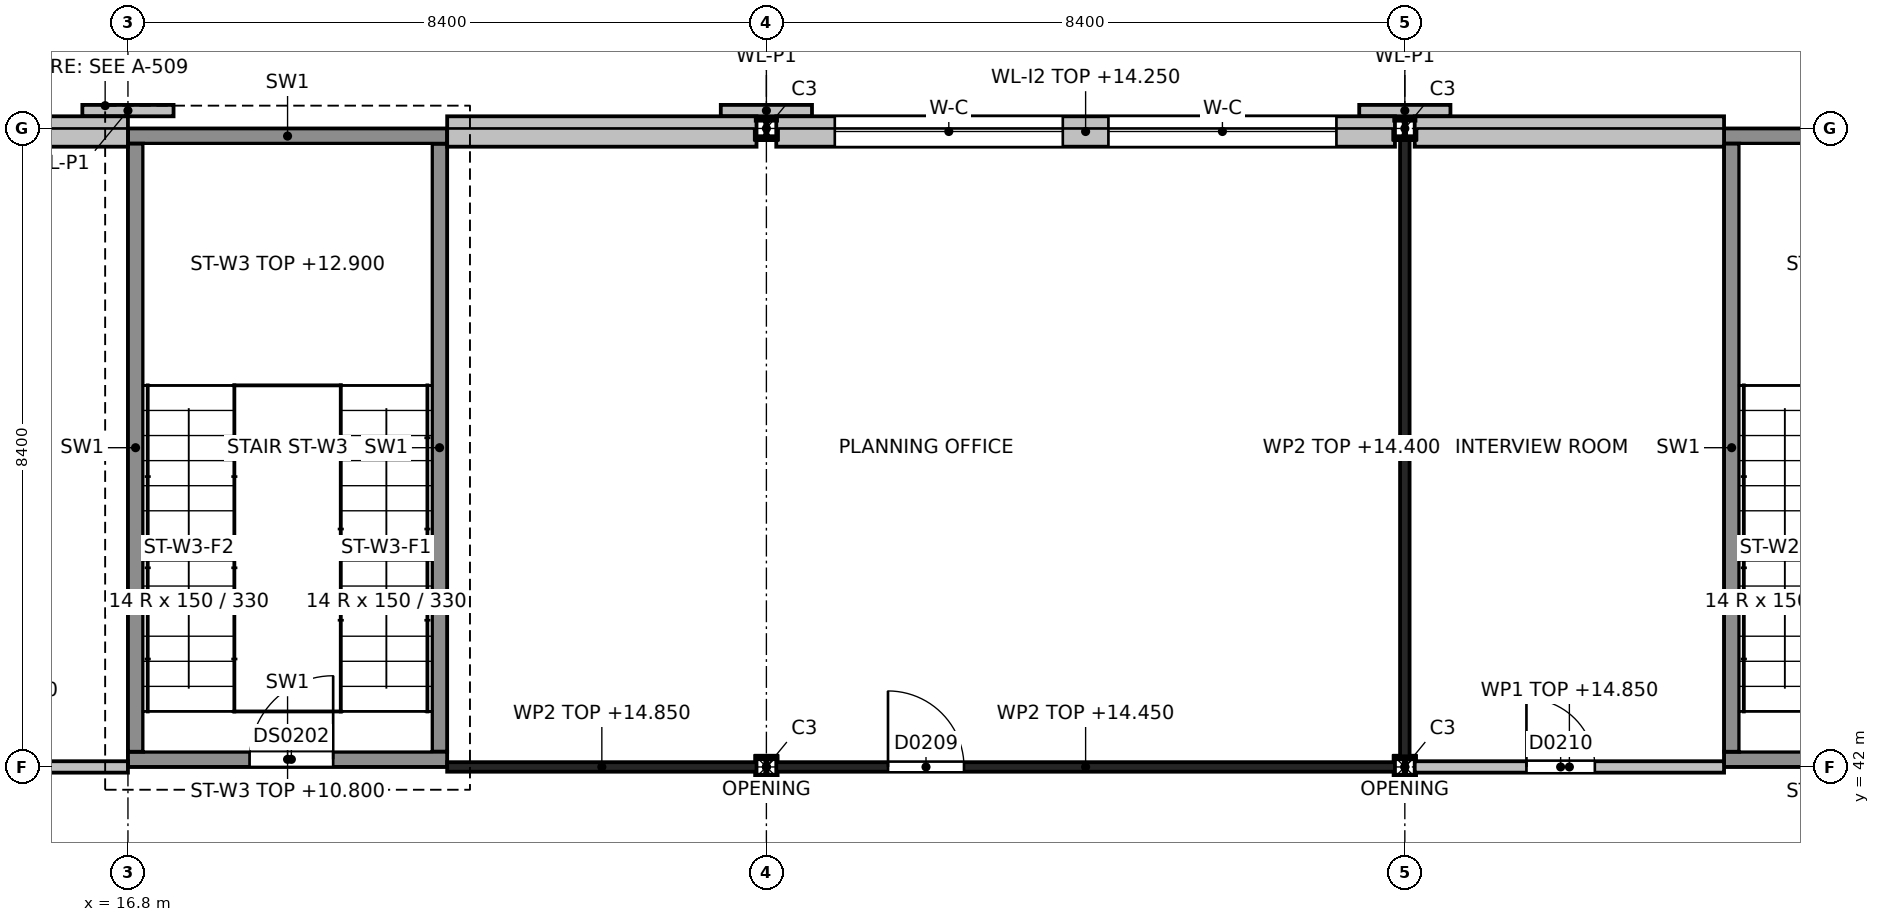
"""IFC4 building model, lengths in metres.
Left out: names, types, materials, properties, quantities, classifications, styles, units other than length and angle.
Written with IfcOpenShell. Run it as: python <this file> out.ifc"""

import sys

from ifc_helpers import new_model, si_unit, direction, frame, frame_2d, origin, origin_2d, place, context, subcontext, project, spatial, rectangle, i_section, extrude, element, fill, save


model = new_model("IFC4")
c1 = context("Model", 3, precision=1e-05, world=origin(), true_north=direction((0.0, 1.0)))
c2 = subcontext(c1, "Body", "Model", "MODEL_VIEW")
j1 = project(units=[si_unit("LENGTHUNIT", "METRE"), si_unit("PLANEANGLEUNIT", "RADIAN")], contexts=[c1])
p1 = place(None, origin())
s1 = spatial("IfcSite", under=j1, at=p1, CompositionType="ELEMENT")
p2 = place(p1, origin())
s2 = spatial("IfcBuilding", under=s1, at=p2, CompositionType="ELEMENT")
p3 = place(p2, frame((0.0, 0.0, 10.8)))
s3 = spatial("IfcBuildingStorey", under=s2, at=p3, CompositionType="ELEMENT", Elevation=10.8)
for number, where, z_axis, x_axis in (
    (1, (25.2, 42.0, 0.0), (0.0, 0.0, 1.0), (1.0, 0.0, 0.0)),
    (2, (25.2, 50.4, 0.0), (0.0, 0.0, 1.0), (1.0, 0.0, 0.0)),
    (3, (33.6, 42.0, 0.0), (0.0, 0.0, 1.0), (1.0, 0.0, 0.0)),
    (4, (33.6, 50.4, 0.0), (0.0, 0.0, 1.0), (1.0, 0.0, 0.0)),
):
    element("IfcColumn", number, at=place(p3, frame(where, z_axis=z_axis, x_axis=x_axis)), inside=s3, PredefinedType="COLUMN", context=c2, shape_type="SweptSolid", body=[
        extrude(i_section(OverallWidth=0.26, OverallDepth=0.26, WebThickness=0.01, FlangeThickness=0.018, at=origin_2d()), origin(), (0.0, 0.0, 1.0), 4.2),
    ])
p4 = place(p3, frame((37.8, 42.1, 0.0), z_axis=(0.0, 0.0, 1.0), x_axis=(1.0, 0.0, 0.0)))
e5 = element("IfcWall", 5, at=p4, inside=s3, PredefinedType="SHEAR", context=c2, shape_type="SweptSolid", body=[
    extrude(rectangle(XDim=4.2, YDim=0.2, at=frame_2d((2.1, 0.0))), origin(), (0.0, 0.0, 1.0), 4.2),
])
p5 = place(p4, frame((1.6, 0.0, 0.0)))
e6 = element("IfcOpeningElement", 6, at=p5, cuts=e5, PredefinedType="OPENING", context=c2, shape_type="SweptSolid", body=[
    extrude(rectangle(XDim=1.1, YDim=2.1, at=frame_2d((0.55, 1.05))), frame((0.0, 0.1, 0.0), z_axis=(0.0, -1.0, 0.0), x_axis=(1.0, 0.0, 0.0)), (0.0, 0.0, 1.0), 0.2),
])
p6 = place(p3, frame((37.8, 50.3, 0.0), z_axis=(0.0, 0.0, 1.0), x_axis=(1.0, 0.0, 0.0)))
e7 = element("IfcWall", 7, at=p6, inside=s3, PredefinedType="SHEAR", context=c2, shape_type="SweptSolid", body=[
    extrude(rectangle(XDim=4.2, YDim=0.2, at=frame_2d((2.1, 0.0))), origin(), (0.0, 0.0, 1.0), 4.2),
])
p7 = place(p3, frame((37.9, 42.2, 0.0), z_axis=(0.0, 0.0, 1.0), x_axis=(0.0, 1.0, 0.0)))
e8 = element("IfcWall", 8, at=p7, inside=s3, PredefinedType="SHEAR", context=c2, shape_type="SweptSolid", body=[
    extrude(rectangle(XDim=8.0, YDim=0.2, at=frame_2d((4.0, 0.0))), origin(), (0.0, 0.0, 1.0), 4.2),
])
p8 = place(p3, frame((16.8, 42.1, 0.0), z_axis=(0.0, 0.0, 1.0), x_axis=(1.0, 0.0, 0.0)))
e9 = element("IfcWall", 9, at=p8, inside=s3, PredefinedType="SHEAR", context=c2, shape_type="SweptSolid", body=[
    extrude(rectangle(XDim=4.2, YDim=0.2, at=frame_2d((2.1, 0.0))), origin(), (0.0, 0.0, 1.0), 4.2),
])
p9 = place(p8, frame((1.6, 0.0, 0.0)))
e10 = element("IfcOpeningElement", 10, at=p9, cuts=e9, PredefinedType="OPENING", context=c2, shape_type="SweptSolid", body=[
    extrude(rectangle(XDim=1.1, YDim=2.1, at=frame_2d((0.55, 1.05))), frame((0.0, 0.1, 0.0), z_axis=(0.0, -1.0, 0.0), x_axis=(1.0, 0.0, 0.0)), (0.0, 0.0, 1.0), 0.2),
])
p10 = place(p3, frame((16.8, 50.3, 0.0), z_axis=(0.0, 0.0, 1.0), x_axis=(1.0, 0.0, 0.0)))
e11 = element("IfcWall", 11, at=p10, inside=s3, PredefinedType="SHEAR", context=c2, shape_type="SweptSolid", body=[
    extrude(rectangle(XDim=4.2, YDim=0.2, at=frame_2d((2.1, 0.0))), origin(), (0.0, 0.0, 1.0), 4.2),
])
for number, where, z_axis, x_axis in (
    (12, (16.9, 42.2, 0.0), (0.0, 0.0, 1.0), (0.0, 1.0, 0.0)),
    (13, (20.9, 42.2, 0.0), (0.0, 0.0, 1.0), (0.0, 1.0, 0.0)),
):
    element("IfcWall", number, at=place(p3, frame(where, z_axis=z_axis, x_axis=x_axis)), inside=s3, PredefinedType="SHEAR", context=c2, shape_type="SweptSolid", body=[
        extrude(rectangle(XDim=8.0, YDim=0.2, at=frame_2d((4.0, 0.0))), origin(), (0.0, 0.0, 1.0), 4.2),
    ])
p11 = place(p3, frame((8.53, 50.36, 0.0), z_axis=(0.0, 0.0, 1.0), x_axis=(1.0, 0.0, 0.0)))
e14 = element("IfcWall", 14, at=p11, inside=s3, PredefinedType="SOLIDWALL", context=c2, shape_type="SweptSolid", body=[
    extrude(rectangle(XDim=8.27, YDim=0.4, at=frame_2d((4.135, 0.0))), origin(), (0.0, 0.0, 1.0), 3.45),
])
p12 = place(p11, frame((1.433, 0.0, 0.9)))
e15 = element("IfcOpeningElement", 15, at=p12, cuts=e14, PredefinedType="OPENING", context=c2, shape_type="SweptSolid", body=[
    extrude(rectangle(XDim=1.2, YDim=2.4, at=frame_2d((0.6, 1.2))), frame((0.0, 0.2, 0.0), z_axis=(0.0, -1.0, 0.0), x_axis=(1.0, 0.0, 0.0)), (0.0, 0.0, 1.0), 0.4),
])
p13 = place(p11, frame((5.508, 0.0, 0.9)))
e16 = element("IfcOpeningElement", 16, at=p13, cuts=e14, PredefinedType="OPENING", context=c2, shape_type="SweptSolid", body=[
    extrude(rectangle(XDim=1.2, YDim=2.4, at=frame_2d((0.6, 1.2))), frame((0.0, 0.2, 0.0), z_axis=(0.0, -1.0, 0.0), x_axis=(1.0, 0.0, 0.0)), (0.0, 0.0, 1.0), 0.4),
])
p14 = place(p3, frame((21.0, 50.36, 0.0), z_axis=(0.0, 0.0, 1.0), x_axis=(1.0, 0.0, 0.0)))
e17 = element("IfcWall", 17, at=p14, inside=s3, PredefinedType="SOLIDWALL", context=c2, shape_type="SweptSolid", body=[
    extrude(rectangle(XDim=4.07, YDim=0.4, at=frame_2d((2.035, 0.0))), origin(), (0.0, 0.0, 1.0), 3.45),
])
p15 = place(p3, frame((25.33, 50.36, 0.0), z_axis=(0.0, 0.0, 1.0), x_axis=(1.0, 0.0, 0.0)))
e18 = element("IfcWall", 18, at=p15, inside=s3, PredefinedType="SOLIDWALL", context=c2, shape_type="SweptSolid", body=[
    extrude(rectangle(XDim=8.14, YDim=0.4, at=frame_2d((4.07, 0.0))), origin(), (0.0, 0.0, 1.0), 3.45),
])
p16 = place(p15, frame((0.77, 0.0, 0.9)))
e19 = element("IfcOpeningElement", 19, at=p16, cuts=e18, PredefinedType="OPENING", context=c2, shape_type="SweptSolid", body=[
    extrude(rectangle(XDim=3.0, YDim=2.4, at=frame_2d((1.5, 1.2))), frame((0.0, 0.2, 0.0), z_axis=(0.0, -1.0, 0.0), x_axis=(1.0, 0.0, 0.0)), (0.0, 0.0, 1.0), 0.4),
])
p17 = place(p15, frame((4.37, 0.0, 0.9)))
e20 = element("IfcOpeningElement", 20, at=p17, cuts=e18, PredefinedType="OPENING", context=c2, shape_type="SweptSolid", body=[
    extrude(rectangle(XDim=3.0, YDim=2.4, at=frame_2d((1.5, 1.2))), frame((0.0, 0.2, 0.0), z_axis=(0.0, -1.0, 0.0), x_axis=(1.0, 0.0, 0.0)), (0.0, 0.0, 1.0), 0.4),
])
p18 = place(p3, frame((33.73, 50.36, 0.0), z_axis=(0.0, 0.0, 1.0), x_axis=(1.0, 0.0, 0.0)))
e21 = element("IfcWall", 21, at=p18, inside=s3, PredefinedType="SOLIDWALL", context=c2, shape_type="SweptSolid", body=[
    extrude(rectangle(XDim=4.07, YDim=0.4, at=frame_2d((2.035, 0.0))), origin(), (0.0, 0.0, 1.0), 3.45),
])
for number, where, z_axis, x_axis in (
    (22, (16.2, 50.635, 0.0), (0.0, 0.0, 1.0), (1.0, 0.0, 0.0)),
    (23, (24.6, 50.635, 0.0), (0.0, 0.0, 1.0), (1.0, 0.0, 0.0)),
    (24, (33.0, 50.635, 0.0), (0.0, 0.0, 1.0), (1.0, 0.0, 0.0)),
):
    element("IfcWall", number, at=place(p3, frame(where, z_axis=z_axis, x_axis=x_axis)), inside=s3, PredefinedType="SOLIDWALL", context=c2, shape_type="SweptSolid", body=[
        extrude(rectangle(XDim=1.2, YDim=0.15, at=frame_2d((0.6, 0.0))), origin(), (0.0, 0.0, 1.0), 4.2),
    ])
p19 = place(p3, frame((12.6, 42.0, 0.0), z_axis=(0.0, 0.0, 1.0), x_axis=(1.0, 0.0, 0.0)))
e25 = element("IfcWall", 25, at=p19, inside=s3, PredefinedType="PARTITIONING", context=c2, shape_type="SweptSolid", body=[
    extrude(rectangle(XDim=4.2, YDim=0.15, at=frame_2d((2.1, 0.0))), origin(), (0.0, 0.0, 1.0), 3.68),
])
p20 = place(p19, frame((1.6, 0.0, 0.0)))
e26 = element("IfcOpeningElement", 26, at=p20, cuts=e25, PredefinedType="OPENING", context=c2, shape_type="SweptSolid", body=[
    extrude(rectangle(XDim=0.9, YDim=2.1, at=frame_2d((0.45, 1.05))), frame((0.0, 0.075, 0.0), z_axis=(0.0, -1.0, 0.0), x_axis=(1.0, 0.0, 0.0)), (0.0, 0.0, 1.0), 0.15),
])
p21 = place(p3, frame((21.0, 42.0, 0.0), z_axis=(0.0, 0.0, 1.0), x_axis=(1.0, 0.0, 0.0)))
e27 = element("IfcWall", 27, at=p21, inside=s3, PredefinedType="PARTITIONING", context=c2, shape_type="SweptSolid", body=[
    extrude(rectangle(XDim=4.07, YDim=0.125, at=frame_2d((2.035, 0.0))), origin(), (0.0, 0.0, 1.0), 4.05),
])
p22 = place(p3, frame((25.33, 42.0, 0.0), z_axis=(0.0, 0.0, 1.0), x_axis=(1.0, 0.0, 0.0)))
e28 = element("IfcWall", 28, at=p22, inside=s3, PredefinedType="PARTITIONING", context=c2, shape_type="SweptSolid", body=[
    extrude(rectangle(XDim=8.14, YDim=0.125, at=frame_2d((4.07, 0.0))), origin(), (0.0, 0.0, 1.0), 3.65),
])
p23 = place(p22, frame((1.47, 0.0, 0.0)))
e29 = element("IfcOpeningElement", 29, at=p23, cuts=e28, PredefinedType="OPENING", context=c2, shape_type="SweptSolid", body=[
    extrude(rectangle(XDim=1.0, YDim=2.2, at=frame_2d((0.5, 1.1))), frame((0.0, 0.062, 0.0), z_axis=(0.0, -1.0, 0.0), x_axis=(1.0, 0.0, 0.0)), (0.0, 0.0, 1.0), 0.125),
])
p24 = place(p3, frame((33.73, 42.0, 0.0), z_axis=(0.0, 0.0, 1.0), x_axis=(1.0, 0.0, 0.0)))
e30 = element("IfcWall", 30, at=p24, inside=s3, PredefinedType="PARTITIONING", context=c2, shape_type="SweptSolid", body=[
    extrude(rectangle(XDim=4.07, YDim=0.15, at=frame_2d((2.035, 0.0))), origin(), (0.0, 0.0, 1.0), 4.05),
])
p25 = place(p24, frame((1.47, 0.0, 0.0)))
e31 = element("IfcOpeningElement", 31, at=p25, cuts=e30, PredefinedType="OPENING", context=c2, shape_type="SweptSolid", body=[
    extrude(rectangle(XDim=0.9, YDim=2.1, at=frame_2d((0.45, 1.05))), frame((0.0, 0.075, 0.0), z_axis=(0.0, -1.0, 0.0), x_axis=(1.0, 0.0, 0.0)), (0.0, 0.0, 1.0), 0.15),
])
p26 = place(p3, frame((33.6, 42.13, 0.0), z_axis=(0.0, 0.0, 1.0), x_axis=(0.0, 1.0, 0.0)))
e32 = element("IfcWall", 32, at=p26, inside=s3, PredefinedType="PARTITIONING", context=c2, shape_type="SweptSolid", body=[
    extrude(rectangle(XDim=8.14, YDim=0.125, at=frame_2d((4.07, 0.0))), origin(), (0.0, 0.0, 1.0), 3.6),
])
p27 = place(p16, origin())
e33 = element("IfcWindow", 33, at=p27, inside=s3, PartitioningType="SINGLE_PANEL", PredefinedType="WINDOW", context=c2, shape_type="SweptSolid", body=[
    extrude(rectangle(XDim=3.0, YDim=2.4, at=frame_2d((1.5, 1.2))), frame((0.0, 0.03, 0.0), z_axis=(0.0, -1.0, 0.0), x_axis=(1.0, 0.0, 0.0)), (0.0, 0.0, 1.0), 0.06),
])
fill(e19, e33)
p28 = place(p17, origin())
e34 = element("IfcWindow", 34, at=p28, inside=s3, PartitioningType="SINGLE_PANEL", PredefinedType="WINDOW", context=c2, shape_type="SweptSolid", body=[
    extrude(rectangle(XDim=3.0, YDim=2.4, at=frame_2d((1.5, 1.2))), frame((0.0, 0.03, 0.0), z_axis=(0.0, -1.0, 0.0), x_axis=(1.0, 0.0, 0.0)), (0.0, 0.0, 1.0), 0.06),
])
fill(e20, e34)
p29 = place(p23, origin())
e35 = element("IfcDoor", 35, at=p29, inside=s3, OperationType="SINGLE_SWING_LEFT", PredefinedType="DOOR", context=c2, shape_type="SweptSolid", body=[
    extrude(rectangle(XDim=1.0, YDim=2.2, at=frame_2d((0.5, 1.1))), frame((0.0, 0.025, 0.0), z_axis=(0.0, -1.0, 0.0), x_axis=(1.0, 0.0, 0.0)), (0.0, 0.0, 1.0), 0.05),
])
fill(e29, e35)
p30 = place(p25, origin())
e36 = element("IfcDoor", 36, at=p30, inside=s3, OperationType="SINGLE_SWING_LEFT", PredefinedType="DOOR", context=c2, shape_type="SweptSolid", body=[
    extrude(rectangle(XDim=0.9, YDim=2.1, at=frame_2d((0.45, 1.05))), frame((0.0, 0.025, 0.0), z_axis=(0.0, -1.0, 0.0), x_axis=(1.0, 0.0, 0.0)), (0.0, 0.0, 1.0), 0.05),
])
fill(e31, e36)
p31 = place(p9, origin())
e37 = element("IfcDoor", 37, at=p31, inside=s3, OperationType="SINGLE_SWING_RIGHT", PredefinedType="DOOR", context=c2, shape_type="SweptSolid", body=[
    extrude(rectangle(XDim=1.1, YDim=2.1, at=frame_2d((0.55, 1.05))), frame((0.0, 0.025, 0.0), z_axis=(0.0, -1.0, 0.0), x_axis=(1.0, 0.0, 0.0)), (0.0, 0.0, 1.0), 0.05),
])
fill(e10, e37)
save(model, sys.argv[1])
